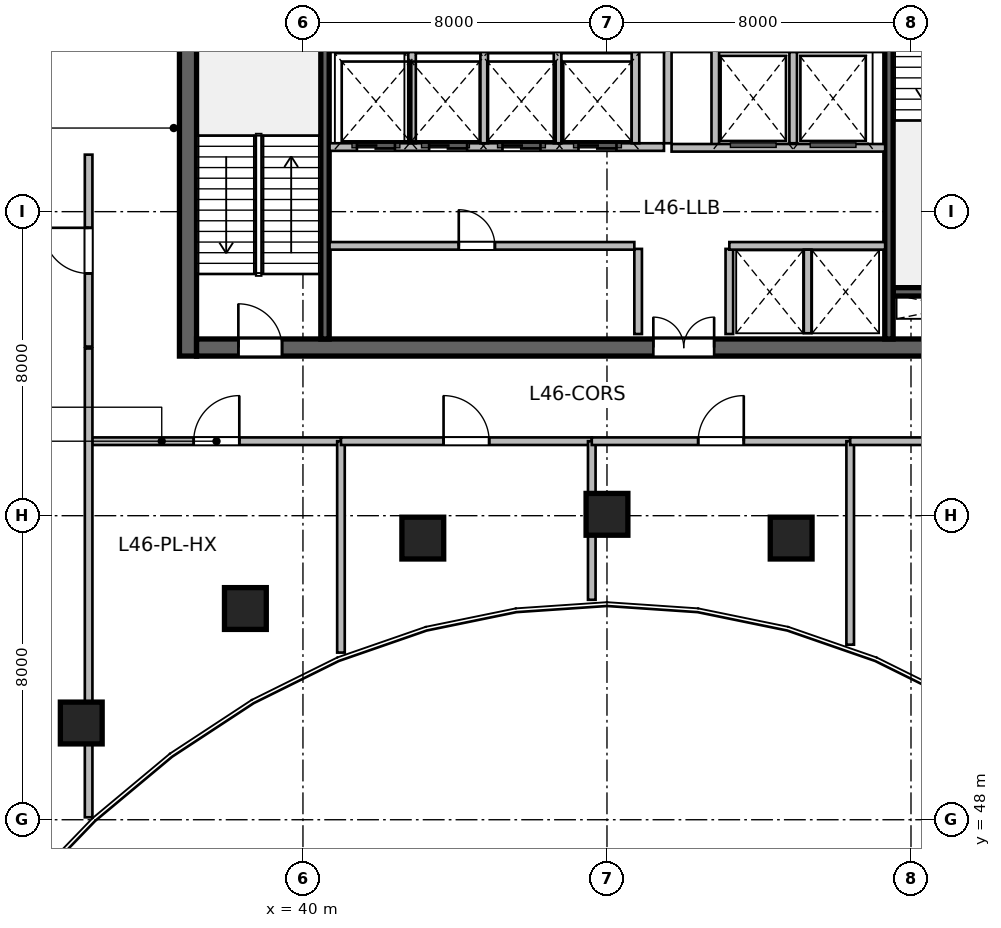
"""IFC4 building model, lengths in metres.
Left out: names, types, materials, properties, quantities, classifications, styles, units other than length and angle.
Written with IfcOpenShell. Run it as: python <this file> out.ifc"""

import sys

from ifc_helpers import new_model, si_unit, direction, frame, frame_2d, origin, origin_2d, place, context, subcontext, project, spatial, rectangle, circle, extrude, source, transform, mapped, element, fill, save


model = new_model("IFC4")
c1 = context("Model", 3, precision=1e-05, world=origin(), true_north=direction((0.0, 1.0)))
c2 = subcontext(c1, "Body", "Model", "MODEL_VIEW")
j1 = project(units=[si_unit("LENGTHUNIT", "METRE"), si_unit("PLANEANGLEUNIT", "RADIAN")], contexts=[c1])
p1 = place(None, origin())
s1 = spatial("IfcSite", under=j1, at=p1, CompositionType="ELEMENT")
p2 = place(p1, origin())
s2 = spatial("IfcBuilding", under=s1, at=p2, CompositionType="ELEMENT")
p3 = place(p2, frame((0.0, 0.0, 189.6)))
s3 = spatial("IfcBuildingStorey", under=s2, at=p3, CompositionType="ELEMENT", Elevation=189.6)
m1 = source(origin(), c2, "Body", "SweptSolid", [
    extrude(rectangle(XDim=12.0, YDim=0.45, at=frame_2d((6.0, 0.0))), origin(), (0.0, 0.0, 1.0), 4.8),
])
p4 = place(p3, frame((36.975, 60.2, 0.0), z_axis=(0.0, 0.0, 1.0), x_axis=(0.0, 1.0, 0.0)))
e1 = element("IfcWall", 1, at=p4, inside=s3, PredefinedType="SHEAR", context=c2, shape_type="MappedRepresentation", body=[
    mapped(m1, transform((0.0, 0.0, 0.0), scale=1.0)),
])
m2 = source(origin(), c2, "Body", "SweptSolid", [
    extrude(rectangle(XDim=21.6, YDim=0.45, at=frame_2d((10.8, 0.0))), origin(), (0.0, 0.0, 1.0), 4.8),
])
p5 = place(p3, frame((37.2, 60.425, 0.0), z_axis=(0.0, 0.0, 1.0), x_axis=(1.0, 0.0, 0.0)))
e2 = element("IfcWall", 2, at=p5, inside=s3, PredefinedType="SHEAR", context=c2, shape_type="MappedRepresentation", body=[
    mapped(m2, transform((0.0, 0.0, 0.0), scale=1.0)),
])
p6 = place(p5, frame((1.1, 0.0, 0.0)))
e3 = element("IfcOpeningElement", 3, at=p6, cuts=e2, PredefinedType="OPENING", context=c2, shape_type="SweptSolid", body=[
    extrude(rectangle(XDim=1.15, YDim=2.15, at=frame_2d((0.575, 1.075))), frame((0.0, 0.235, 0.0), z_axis=(0.0, -1.0, 0.0), x_axis=(1.0, 0.0, 0.0)), (0.0, 0.0, 1.0), 0.47),
])
p7 = place(p5, frame((19.5, 0.0, 0.0)))
e4 = element("IfcOpeningElement", 4, at=p7, cuts=e2, PredefinedType="OPENING", context=c2, shape_type="SweptSolid", body=[
    extrude(rectangle(XDim=0.9, YDim=2.1, at=frame_2d((0.45, 1.05))), frame((0.0, 0.235, 0.0), z_axis=(0.0, -1.0, 0.0), x_axis=(1.0, 0.0, 0.0)), (0.0, 0.0, 1.0), 0.47),
])
p8 = place(p5, frame((12.02, 0.0, 0.0)))
e5 = element("IfcOpeningElement", 5, at=p8, cuts=e2, PredefinedType="OPENING", context=c2, shape_type="SweptSolid", body=[
    extrude(rectangle(XDim=1.6, YDim=2.15, at=frame_2d((0.8, 1.075))), frame((0.0, 0.235, 0.0), z_axis=(0.0, -1.0, 0.0), x_axis=(1.0, 0.0, 0.0)), (0.0, 0.0, 1.0), 0.47),
])
m3 = source(origin(), c2, "Body", "SweptSolid", [
    extrude(rectangle(XDim=3.27, YDim=0.22, at=frame_2d((1.635, 0.0))), origin(), (0.0, 0.0, 1.0), 4.8),
])
p9 = place(p3, frame((55.53, 61.89, 0.0), z_axis=(0.0, 0.0, 1.0), x_axis=(1.0, 0.0, 0.0)))
e6 = element("IfcWall", 6, at=p9, inside=s3, PredefinedType="SHEAR", context=c2, shape_type="MappedRepresentation", body=[
    mapped(m3, transform((0.0, 0.0, 0.0), scale=1.0)),
])
m4 = source(origin(), c2, "Body", "SweptSolid", [
    extrude(rectangle(XDim=11.1, YDim=0.22, at=frame_2d((5.55, 0.0))), origin(), (0.0, 0.0, 1.0), 4.8),
])
p10 = place(p3, frame((40.58, 60.65, 0.0), z_axis=(0.0, 0.0, 1.0), x_axis=(0.0, 1.0, 0.0)))
e7 = element("IfcWall", 7, at=p10, inside=s3, PredefinedType="SHEAR", context=c2, shape_type="MappedRepresentation", body=[
    mapped(m4, transform((0.0, 0.0, 0.0), scale=1.0)),
])
p11 = place(p3, frame((55.42, 60.65, 0.0), z_axis=(0.0, 0.0, 1.0), x_axis=(0.0, 1.0, 0.0)))
e8 = element("IfcWall", 8, at=p11, inside=s3, PredefinedType="SHEAR", context=c2, shape_type="MappedRepresentation", body=[
    mapped(m4, transform((0.0, 0.0, 0.0), scale=1.0)),
])
p12 = place(p11, frame((9.595, 0.0, 0.0)))
e9 = element("IfcOpeningElement", 9, at=p12, cuts=e8, PredefinedType="OPENING", context=c2, shape_type="SweptSolid", body=[
    extrude(rectangle(XDim=1.15, YDim=2.15, at=frame_2d((0.575, 1.075))), frame((0.0, 0.12, 0.0), z_axis=(0.0, -1.0, 0.0), x_axis=(1.0, 0.0, 0.0)), (0.0, 0.0, 1.0), 0.24),
])
m5 = source(origin(), c2, "Body", "SweptSolid", [
    extrude(circle(Radius=0.55, at=origin_2d()), origin(), (0.0, 0.0, 1.0), 4.8),
])
for number, where, z_axis, x_axis in (
    (10, (34.166, 50.545, 0.0), (0.0, 0.0, 1.0), (-0.436, 0.9, 0.0)),
    (11, (38.485, 53.558, 0.0), (0.0, 0.0, 1.0), (-0.289, 0.957, 0.0)),
    (12, (43.154, 55.411, 0.0), (0.0, 0.0, 1.0), (-0.143, 0.99, 0.0)),
    (13, (48.0, 56.036, 0.0), (0.0, 0.0, 1.0), (0.0, 1.0, 0.0)),
    (14, (52.846, 55.411, 0.0), (0.0, 0.0, 1.0), (0.143, 0.99, 0.0)),
):
    element("IfcColumn", number, at=place(p3, frame(where, z_axis=z_axis, x_axis=x_axis)), inside=s3, PredefinedType="COLUMN", context=c2, shape_type="MappedRepresentation", body=[
        mapped(m5, transform((0.0, 0.0, 0.0), scale=1.0)),
    ])
m6 = source(origin(), c2, "Body", "SweptSolid", [
    extrude(rectangle(XDim=2.24, YDim=0.2, at=frame_2d((1.12, 0.0))), origin(), (0.0, 0.0, 1.0), 4.48),
])
for number, where, z_axis, x_axis in (
    (15, (48.82, 60.78, 0.0), (0.0, 0.0, 1.0), (0.0, 1.0, 0.0)),
    (16, (51.22, 60.78, 0.0), (0.0, 0.0, 1.0), (0.0, 1.0, 0.0)),
):
    element("IfcWall", number, at=place(p3, frame(where, z_axis=z_axis, x_axis=x_axis)), inside=s3, PredefinedType="SOLIDWALL", context=c2, shape_type="MappedRepresentation", body=[
        mapped(m6, transform((0.0, 0.0, 0.0), scale=1.0)),
    ])
m7 = source(origin(), c2, "Body", "SweptSolid", [
    extrude(rectangle(XDim=5.8, YDim=0.2, at=frame_2d((2.9, 0.0))), origin(), (0.0, 0.0, 1.0), 4.48),
])
p13 = place(p3, frame((49.6, 65.8, 0.0), z_axis=(0.0, 0.0, 1.0), x_axis=(0.0, 1.0, 0.0)))
e17 = element("IfcWall", 17, at=p13, inside=s3, PredefinedType="SOLIDWALL", context=c2, shape_type="MappedRepresentation", body=[
    mapped(m7, transform((0.0, 0.0, 0.0), scale=1.0)),
])
m8 = source(origin(), c2, "Body", "SweptSolid", [
    extrude(rectangle(XDim=2.58, YDim=0.2, at=frame_2d((1.29, 0.0))), origin(), (0.0, 0.0, 1.0), 4.48),
])
p14 = place(p3, frame((50.85, 65.68, 0.0), z_axis=(0.0, 0.0, 1.0), x_axis=(0.0, 1.0, 0.0)))
e18 = element("IfcWall", 18, at=p14, inside=s3, PredefinedType="SOLIDWALL", context=c2, shape_type="MappedRepresentation", body=[
    mapped(m8, transform((0.0, 0.0, 0.0), scale=1.0)),
])
m9 = source(origin(), c2, "Body", "SweptSolid", [
    extrude(rectangle(XDim=2.4, YDim=0.2, at=frame_2d((1.2, 0.0))), origin(), (0.0, 0.0, 1.0), 4.48),
])
p15 = place(p3, frame((52.9, 65.8, 0.0), z_axis=(0.0, 0.0, 1.0), x_axis=(0.0, 1.0, 0.0)))
e19 = element("IfcWall", 19, at=p15, inside=s3, PredefinedType="SOLIDWALL", context=c2, shape_type="MappedRepresentation", body=[
    mapped(m9, transform((0.0, 0.0, 0.0), scale=1.0)),
])
m10 = source(origin(), c2, "Body", "SweptSolid", [
    extrude(rectangle(XDim=5.62, YDim=0.2, at=frame_2d((2.81, 0.0))), origin(), (0.0, 0.0, 1.0), 4.48),
])
p16 = place(p3, frame((49.7, 65.68, 0.0), z_axis=(0.0, 0.0, 1.0), x_axis=(1.0, 0.0, 0.0)))
e20 = element("IfcWall", 20, at=p16, inside=s3, PredefinedType="SOLIDWALL", context=c2, shape_type="MappedRepresentation", body=[
    mapped(m10, transform((0.0, 0.0, 0.0), scale=1.0)),
])
m11 = source(origin(), c2, "Body", "SweptSolid", [
    extrude(rectangle(XDim=8.02, YDim=0.2, at=frame_2d((4.01, 0.0))), origin(), (0.0, 0.0, 1.0), 4.48),
])
p17 = place(p3, frame((40.7, 63.1, 0.0), z_axis=(0.0, 0.0, 1.0), x_axis=(1.0, 0.0, 0.0)))
e21 = element("IfcWall", 21, at=p17, inside=s3, PredefinedType="SOLIDWALL", context=c2, shape_type="MappedRepresentation", body=[
    mapped(m11, transform((0.0, 0.0, 0.0), scale=1.0)),
])
p18 = place(p17, frame((3.4, 0.0, 0.0)))
e22 = element("IfcOpeningElement", 22, at=p18, cuts=e21, PredefinedType="OPENING", context=c2, shape_type="SweptSolid", body=[
    extrude(rectangle(XDim=0.95, YDim=2.15, at=frame_2d((0.475, 1.075))), frame((0.0, 0.11, 0.0), z_axis=(0.0, -1.0, 0.0), x_axis=(1.0, 0.0, 0.0)), (0.0, 0.0, 1.0), 0.22),
])
m12 = source(origin(), c2, "Body", "SweptSolid", [
    extrude(rectangle(XDim=4.1, YDim=0.2, at=frame_2d((2.05, 0.0))), origin(), (0.0, 0.0, 1.0), 4.48),
])
p19 = place(p3, frame((51.22, 63.1, 0.0), z_axis=(0.0, 0.0, 1.0), x_axis=(1.0, 0.0, 0.0)))
e23 = element("IfcWall", 23, at=p19, inside=s3, PredefinedType="SOLIDWALL", context=c2, shape_type="MappedRepresentation", body=[
    mapped(m12, transform((0.0, 0.0, 0.0), scale=1.0)),
])
m13 = source(origin(), c2, "Body", "SweptSolid", [
    extrude(rectangle(XDim=2.2, YDim=0.2, at=frame_2d((1.1, 0.0))), origin(), (0.0, 0.0, 1.0), 4.48),
])
p20 = place(p3, frame((53.28, 60.8, 0.0), z_axis=(0.0, 0.0, 1.0), x_axis=(0.0, 1.0, 0.0)))
e24 = element("IfcWall", 24, at=p20, inside=s3, PredefinedType="SOLIDWALL", context=c2, shape_type="MappedRepresentation", body=[
    mapped(m13, transform((0.0, 0.0, 0.0), scale=1.0)),
])
m14 = source(origin(), c2, "Body", "SweptSolid", [
    extrude(rectangle(XDim=8.8, YDim=0.2, at=frame_2d((4.4, 0.0))), origin(), (0.0, 0.0, 1.0), 4.48),
])
p21 = place(p3, frame((40.7, 65.7, 0.0), z_axis=(0.0, 0.0, 1.0), x_axis=(1.0, 0.0, 0.0)))
e25 = element("IfcWall", 25, at=p21, inside=s3, PredefinedType="SOLIDWALL", context=c2, shape_type="MappedRepresentation", body=[
    mapped(m14, transform((0.0, 0.0, 0.0), scale=1.0)),
])
p22 = place(p21, frame((0.72, 0.0, 0.0)))
e26 = element("IfcOpeningElement", 26, at=p22, cuts=e25, PredefinedType="OPENING", context=c2, shape_type="SweptSolid", body=[
    extrude(rectangle(XDim=1.0, YDim=2.15, at=frame_2d((0.5, 1.075))), frame((0.0, 0.11, 0.0), z_axis=(0.0, -1.0, 0.0), x_axis=(1.0, 0.0, 0.0)), (0.0, 0.0, 1.0), 0.22),
])
p23 = place(p21, frame((2.62, 0.0, 0.0)))
e27 = element("IfcOpeningElement", 27, at=p23, cuts=e25, PredefinedType="OPENING", context=c2, shape_type="SweptSolid", body=[
    extrude(rectangle(XDim=1.0, YDim=2.15, at=frame_2d((0.5, 1.075))), frame((0.0, 0.11, 0.0), z_axis=(0.0, -1.0, 0.0), x_axis=(1.0, 0.0, 0.0)), (0.0, 0.0, 1.0), 0.22),
])
p24 = place(p21, frame((4.55, 0.0, 0.0)))
e28 = element("IfcOpeningElement", 28, at=p24, cuts=e25, PredefinedType="OPENING", context=c2, shape_type="SweptSolid", body=[
    extrude(rectangle(XDim=1.0, YDim=2.15, at=frame_2d((0.5, 1.075))), frame((0.0, 0.11, 0.0), z_axis=(0.0, -1.0, 0.0), x_axis=(1.0, 0.0, 0.0)), (0.0, 0.0, 1.0), 0.22),
])
p25 = place(p21, frame((6.55, 0.0, 0.0)))
e29 = element("IfcOpeningElement", 29, at=p25, cuts=e25, PredefinedType="OPENING", context=c2, shape_type="SweptSolid", body=[
    extrude(rectangle(XDim=1.0, YDim=2.15, at=frame_2d((0.5, 1.075))), frame((0.0, 0.11, 0.0), z_axis=(0.0, -1.0, 0.0), x_axis=(1.0, 0.0, 0.0)), (0.0, 0.0, 1.0), 0.22),
])
for number, where, z_axis, x_axis in (
    (30, (48.75, 65.8, 0.0), (0.0, 0.0, 1.0), (0.0, 1.0, 0.0)),
    (31, (42.87, 65.8, 0.0), (0.0, 0.0, 1.0), (0.0, 1.0, 0.0)),
    (32, (44.77, 65.8, 0.0), (0.0, 0.0, 1.0), (0.0, 1.0, 0.0)),
    (33, (46.7, 65.8, 0.0), (0.0, 0.0, 1.0), (0.0, 1.0, 0.0)),
):
    element("IfcWall", number, at=place(p3, frame(where, z_axis=z_axis, x_axis=x_axis)), inside=s3, PredefinedType="SOLIDWALL", context=c2, shape_type="MappedRepresentation", body=[
        mapped(m9, transform((0.0, 0.0, 0.0), scale=1.0)),
    ])
m15 = source(origin(), c2, "Body", "SweptSolid", [
    extrude(rectangle(XDim=6.55, YDim=0.2, at=frame_2d((3.275, 0.0))), origin(), (0.0, 0.0, 1.0), 4.48),
])
p26 = place(p3, frame((34.45, 57.96, 0.0), z_axis=(0.0, 0.0, 1.0), x_axis=(1.0, 0.0, 0.0)))
e34 = element("IfcWall", 34, at=p26, inside=s3, PredefinedType="SOLIDWALL", context=c2, shape_type="MappedRepresentation", body=[
    mapped(m15, transform((0.0, 0.0, 0.0), scale=1.0)),
])
p27 = place(p26, frame((2.675, 0.0, 0.0)))
e35 = element("IfcOpeningElement", 35, at=p27, cuts=e34, PredefinedType="OPENING", context=c2, shape_type="SweptSolid", body=[
    extrude(rectangle(XDim=1.2, YDim=2.15, at=frame_2d((0.6, 1.075))), frame((0.0, 0.11, 0.0), z_axis=(0.0, -1.0, 0.0), x_axis=(1.0, 0.0, 0.0)), (0.0, 0.0, 1.0), 0.22),
])
m16 = source(origin(), c2, "Body", "SweptSolid", [
    extrude(rectangle(XDim=5.562, YDim=0.2, at=frame_2d((2.781, 0.0))), origin(), (0.0, 0.0, 1.0), 4.48),
])
p28 = place(p3, frame((41.0, 52.398, 0.0), z_axis=(0.0, 0.0, 1.0), x_axis=(0.0, 1.0, 0.0)))
e36 = element("IfcWall", 36, at=p28, inside=s3, PredefinedType="SOLIDWALL", context=c2, shape_type="MappedRepresentation", body=[
    mapped(m16, transform((0.0, 0.0, 0.0), scale=1.0)),
])
m17 = source(origin(), c2, "Body", "SweptSolid", [
    extrude(rectangle(XDim=6.6, YDim=0.2, at=frame_2d((3.3, 0.0))), origin(), (0.0, 0.0, 1.0), 3.925),
])
p29 = place(p3, frame((41.0, 57.96, 0.0), z_axis=(0.0, 0.0, 1.0), x_axis=(1.0, 0.0, 0.0)))
e37 = element("IfcWall", 37, at=p29, inside=s3, PredefinedType="SOLIDWALL", context=c2, shape_type="MappedRepresentation", body=[
    mapped(m17, transform((0.0, 0.0, 0.0), scale=1.0)),
])
p30 = place(p29, frame((2.7, 0.0, 0.0)))
e38 = element("IfcOpeningElement", 38, at=p30, cuts=e37, PredefinedType="OPENING", context=c2, shape_type="SweptSolid", body=[
    extrude(rectangle(XDim=1.2, YDim=2.15, at=frame_2d((0.6, 1.075))), frame((0.0, 0.11, 0.0), z_axis=(0.0, -1.0, 0.0), x_axis=(1.0, 0.0, 0.0)), (0.0, 0.0, 1.0), 0.22),
])
m18 = source(origin(), c2, "Body", "SweptSolid", [
    extrude(rectangle(XDim=4.173, YDim=0.2, at=frame_2d((2.086, 0.0))), origin(), (0.0, 0.0, 1.0), 4.48),
])
p31 = place(p3, frame((47.6, 53.787, 0.0), z_axis=(0.0, 0.0, 1.0), x_axis=(0.0, 1.0, 0.0)))
e39 = element("IfcWall", 39, at=p31, inside=s3, PredefinedType="SOLIDWALL", context=c2, shape_type="MappedRepresentation", body=[
    mapped(m18, transform((0.0, 0.0, 0.0), scale=1.0)),
])
m19 = source(origin(), c2, "Body", "SweptSolid", [
    extrude(rectangle(XDim=6.8, YDim=0.2, at=frame_2d((3.4, 0.0))), origin(), (0.0, 0.0, 1.0), 3.925),
])
p32 = place(p3, frame((47.6, 57.96, 0.0), z_axis=(0.0, 0.0, 1.0), x_axis=(1.0, 0.0, 0.0)))
e40 = element("IfcWall", 40, at=p32, inside=s3, PredefinedType="SOLIDWALL", context=c2, shape_type="MappedRepresentation", body=[
    mapped(m19, transform((0.0, 0.0, 0.0), scale=1.0)),
])
p33 = place(p32, frame((2.8, 0.0, 0.0)))
e41 = element("IfcOpeningElement", 41, at=p33, cuts=e40, PredefinedType="OPENING", context=c2, shape_type="SweptSolid", body=[
    extrude(rectangle(XDim=1.2, YDim=2.15, at=frame_2d((0.6, 1.075))), frame((0.0, 0.11, 0.0), z_axis=(0.0, -1.0, 0.0), x_axis=(1.0, 0.0, 0.0)), (0.0, 0.0, 1.0), 0.22),
])
m20 = source(origin(), c2, "Body", "SweptSolid", [
    extrude(rectangle(XDim=5.354, YDim=0.2, at=frame_2d((2.677, 0.0))), origin(), (0.0, 0.0, 1.0), 4.48),
])
p34 = place(p3, frame((54.4, 52.606, 0.0), z_axis=(0.0, 0.0, 1.0), x_axis=(0.0, 1.0, 0.0)))
e42 = element("IfcWall", 42, at=p34, inside=s3, PredefinedType="SOLIDWALL", context=c2, shape_type="MappedRepresentation", body=[
    mapped(m20, transform((0.0, 0.0, 0.0), scale=1.0)),
])
m21 = source(origin(), c2, "Body", "SweptSolid", [
    extrude(rectangle(XDim=7.15, YDim=0.2, at=frame_2d((3.575, 0.0))), origin(), (0.0, 0.0, 1.0), 3.925),
])
p35 = place(p3, frame((54.4, 57.96, 0.0), z_axis=(0.0, 0.0, 1.0), x_axis=(1.0, 0.0, 0.0)))
e43 = element("IfcWall", 43, at=p35, inside=s3, PredefinedType="SOLIDWALL", context=c2, shape_type="MappedRepresentation", body=[
    mapped(m21, transform((0.0, 0.0, 0.0), scale=1.0)),
])
p36 = place(p35, frame((2.975, 0.0, 0.0)))
e44 = element("IfcOpeningElement", 44, at=p36, cuts=e43, PredefinedType="OPENING", context=c2, shape_type="SweptSolid", body=[
    extrude(rectangle(XDim=1.2, YDim=2.15, at=frame_2d((0.6, 1.075))), frame((0.0, 0.11, 0.0), z_axis=(0.0, -1.0, 0.0), x_axis=(1.0, 0.0, 0.0)), (0.0, 0.0, 1.0), 0.22),
])
m22 = source(origin(), c2, "Body", "SweptSolid", [
    extrude(rectangle(XDim=12.336, YDim=0.2, at=frame_2d((6.168, 0.0))), origin(), (0.0, 0.0, 1.0), 4.48),
])
p37 = place(p3, frame((34.36, 48.064, 0.0), z_axis=(0.0, 0.0, 1.0), x_axis=(0.0, 1.0, 0.0)))
e45 = element("IfcWall", 45, at=p37, inside=s3, PredefinedType="SOLIDWALL", context=c2, shape_type="MappedRepresentation", body=[
    mapped(m22, transform((0.0, 0.0, 0.0), scale=1.0)),
])
m23 = source(origin(), c2, "Body", "SweptSolid", [
    extrude(rectangle(XDim=5.05, YDim=0.2, at=frame_2d((2.525, 0.0))), origin(), (0.0, 0.0, 1.0), 4.48),
])
p38 = place(p3, frame((34.36, 60.45, 0.0), z_axis=(0.0, 0.0, 1.0), x_axis=(0.0, 1.0, 0.0)))
e46 = element("IfcWall", 46, at=p38, inside=s3, PredefinedType="SOLIDWALL", context=c2, shape_type="MappedRepresentation", body=[
    mapped(m23, transform((0.0, 0.0, 0.0), scale=1.0)),
])
p39 = place(p38, frame((1.925, 0.0, 0.0)))
e47 = element("IfcOpeningElement", 47, at=p39, cuts=e46, PredefinedType="OPENING", context=c2, shape_type="SweptSolid", body=[
    extrude(rectangle(XDim=1.2, YDim=2.15, at=frame_2d((0.6, 1.075))), frame((0.0, 0.11, 0.0), z_axis=(0.0, -1.0, 0.0), x_axis=(1.0, 0.0, 0.0)), (0.0, 0.0, 1.0), 0.22),
])
m24 = source(origin(), c2, "Body", "SweptSolid", [
    extrude(rectangle(XDim=1.15, YDim=2.15, at=frame_2d((0.575, 1.075))), frame((0.0, 0.025, 0.0), z_axis=(0.0, -1.0, 0.0), x_axis=(1.0, 0.0, 0.0)), (0.0, 0.0, 1.0), 0.05),
])
p40 = place(p6, origin())
e48 = element("IfcDoor", 48, at=p40, inside=s3, OperationType="SINGLE_SWING_LEFT", PredefinedType="DOOR", context=c2, shape_type="MappedRepresentation", body=[
    mapped(m24, transform((0.0, 0.0, 0.0), scale=1.0)),
])
fill(e3, e48)
m25 = source(origin(), c2, "Body", "SweptSolid", [
    extrude(rectangle(XDim=1.6, YDim=2.15, at=frame_2d((0.8, 1.075))), frame((0.0, 0.025, 0.0), z_axis=(0.0, -1.0, 0.0), x_axis=(1.0, 0.0, 0.0)), (0.0, 0.0, 1.0), 0.05),
])
p41 = place(p8, origin())
e49 = element("IfcDoor", 49, at=p41, inside=s3, OperationType="DOUBLE_DOOR_SINGLE_SWING", PredefinedType="DOOR", context=c2, shape_type="MappedRepresentation", body=[
    mapped(m25, transform((0.0, 0.0, 0.0), scale=1.0)),
])
fill(e5, e49)
m26 = source(origin(), c2, "Body", "SweptSolid", [
    extrude(rectangle(XDim=0.95, YDim=2.15, at=frame_2d((0.475, 1.075))), frame((0.0, 0.025, 0.0), z_axis=(0.0, -1.0, 0.0), x_axis=(1.0, 0.0, 0.0)), (0.0, 0.0, 1.0), 0.05),
])
p42 = place(p18, origin())
e50 = element("IfcDoor", 50, at=p42, inside=s3, OperationType="SINGLE_SWING_LEFT", PredefinedType="DOOR", context=c2, shape_type="MappedRepresentation", body=[
    mapped(m26, transform((0.0, 0.0, 0.0), scale=1.0)),
])
fill(e22, e50)
m27 = source(origin(), c2, "Body", "SweptSolid", [
    extrude(rectangle(XDim=1.0, YDim=2.15, at=frame_2d((0.5, 1.075))), frame((0.0, 0.025, 0.0), z_axis=(0.0, -1.0, 0.0), x_axis=(1.0, 0.0, 0.0)), (0.0, 0.0, 1.0), 0.05),
])
p43 = place(p22, origin())
e51 = element("IfcDoor", 51, at=p43, inside=s3, OperationType="DOUBLE_DOOR_SLIDING", PredefinedType="DOOR", context=c2, shape_type="MappedRepresentation", body=[
    mapped(m27, transform((0.0, 0.0, 0.0), scale=1.0)),
])
fill(e26, e51)
p44 = place(p23, origin())
e52 = element("IfcDoor", 52, at=p44, inside=s3, OperationType="DOUBLE_DOOR_SLIDING", PredefinedType="DOOR", context=c2, shape_type="MappedRepresentation", body=[
    mapped(m27, transform((0.0, 0.0, 0.0), scale=1.0)),
])
fill(e27, e52)
p45 = place(p24, origin())
e53 = element("IfcDoor", 53, at=p45, inside=s3, OperationType="DOUBLE_DOOR_SLIDING", PredefinedType="DOOR", context=c2, shape_type="MappedRepresentation", body=[
    mapped(m27, transform((0.0, 0.0, 0.0), scale=1.0)),
])
fill(e28, e53)
p46 = place(p25, origin())
e54 = element("IfcDoor", 54, at=p46, inside=s3, OperationType="DOUBLE_DOOR_SLIDING", PredefinedType="DOOR", context=c2, shape_type="MappedRepresentation", body=[
    mapped(m27, transform((0.0, 0.0, 0.0), scale=1.0)),
])
fill(e29, e54)
m28 = source(origin(), c2, "Body", "SweptSolid", [
    extrude(rectangle(XDim=1.2, YDim=2.15, at=frame_2d((0.6, 1.075))), frame((0.0, 0.025, 0.0), z_axis=(0.0, -1.0, 0.0), x_axis=(1.0, 0.0, 0.0)), (0.0, 0.0, 1.0), 0.05),
])
p47 = place(p27, origin())
e55 = element("IfcDoor", 55, at=p47, inside=s3, OperationType="SINGLE_SWING_RIGHT", PredefinedType="DOOR", context=c2, shape_type="MappedRepresentation", body=[
    mapped(m28, transform((0.0, 0.0, 0.0), scale=1.0)),
])
fill(e35, e55)
p48 = place(p30, origin())
e56 = element("IfcDoor", 56, at=p48, inside=s3, OperationType="SINGLE_SWING_LEFT", PredefinedType="DOOR", context=c2, shape_type="MappedRepresentation", body=[
    mapped(m28, transform((0.0, 0.0, 0.0), scale=1.0)),
])
fill(e38, e56)
p49 = place(p33, origin())
e57 = element("IfcDoor", 57, at=p49, inside=s3, OperationType="SINGLE_SWING_RIGHT", PredefinedType="DOOR", context=c2, shape_type="MappedRepresentation", body=[
    mapped(m28, transform((0.0, 0.0, 0.0), scale=1.0)),
])
fill(e41, e57)
p50 = place(p39, origin())
e58 = element("IfcDoor", 58, at=p50, inside=s3, OperationType="SINGLE_SWING_RIGHT", PredefinedType="DOOR", context=c2, shape_type="MappedRepresentation", body=[
    mapped(m28, transform((0.0, 0.0, 0.0), scale=1.0)),
])
fill(e47, e58)
save(model, sys.argv[1])
